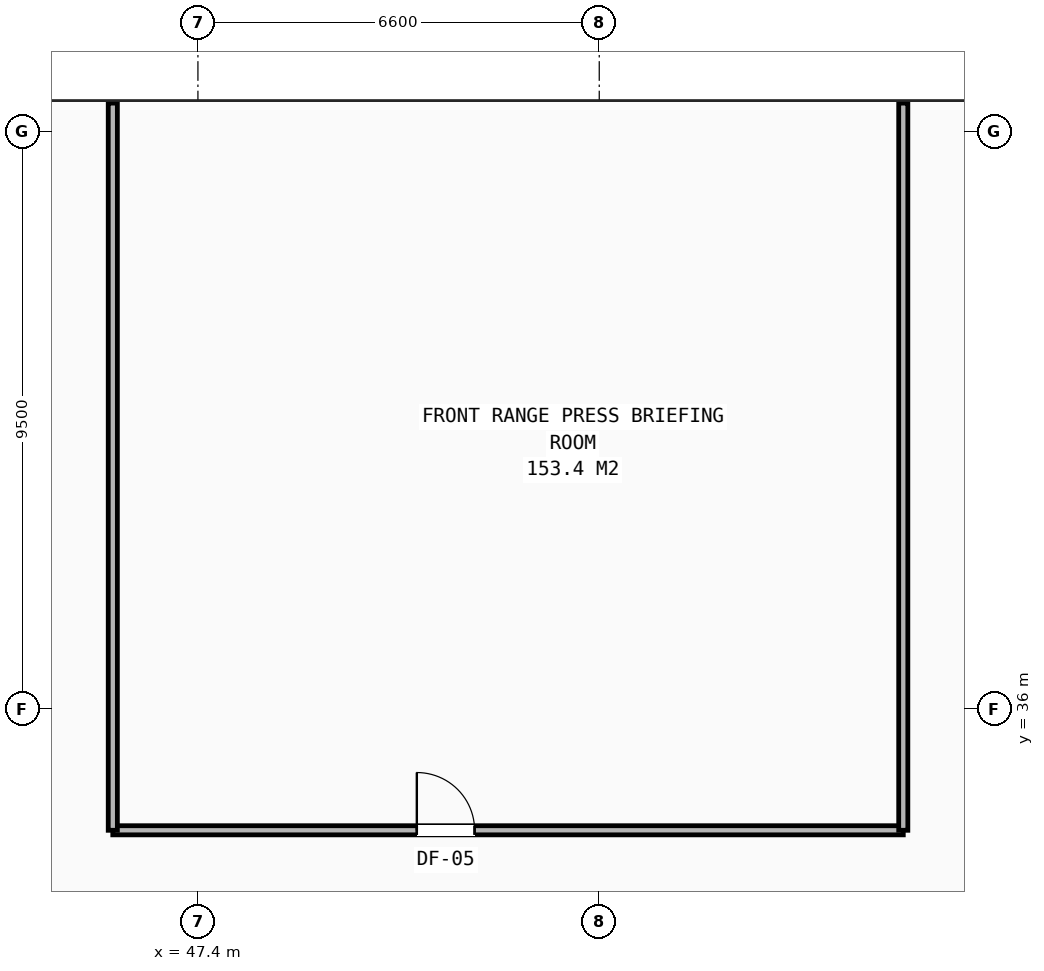
"""IFC4 building model, lengths in metres.
Left out: names, types, materials, properties, quantities, classifications, styles, units other than length and angle.
Written with IfcOpenShell. Run it as: python <this file> out.ifc"""

import sys

from ifc_helpers import new_model, si_unit, direction, frame, frame_2d, origin, place, context, subcontext, project, spatial, rectangle, extrude, element, fill, save


model = new_model("IFC4")
c1 = context("Model", 3, precision=1e-05, world=origin(), true_north=direction((0.0, 1.0)))
c2 = subcontext(c1, "Body", "Model", "MODEL_VIEW")
j1 = project(units=[si_unit("LENGTHUNIT", "METRE"), si_unit("PLANEANGLEUNIT", "RADIAN")], contexts=[c1])
p1 = place(None, origin())
s1 = spatial("IfcSite", under=j1, at=p1, CompositionType="ELEMENT")
p2 = place(p1, origin())
s2 = spatial("IfcBuilding", under=s1, at=p2, CompositionType="ELEMENT")
p3 = place(p2, frame((0.0, 0.0, 5.5)))
s3 = spatial("IfcBuildingStorey", under=s2, at=p3, CompositionType="ELEMENT", Elevation=5.5)
p4 = place(p3, frame((46.0, 34.0, 0.0), z_axis=(0.0, 0.0, 1.0), x_axis=(1.0, 0.0, 0.0)))
e1 = element("IfcWall", 1, at=p4, inside=s3, PredefinedType="PARTITIONING", context=c2, shape_type="SweptSolid", body=[
    extrude(rectangle(XDim=13.0, YDim=0.15, at=frame_2d((6.5, 0.0))), origin(), (0.0, 0.0, 1.0), 4.195),
])
p5 = place(p4, frame((5.0, 0.0, 0.0)))
e2 = element("IfcOpeningElement", 2, at=p5, cuts=e1, PredefinedType="OPENING", context=c2, shape_type="SweptSolid", body=[
    extrude(rectangle(XDim=0.95, YDim=2.1, at=frame_2d((0.475, 1.05))), frame((0.0, 0.085, 0.0), z_axis=(0.0, -1.0, 0.0), x_axis=(1.0, 0.0, 0.0)), (0.0, 0.0, 1.0), 0.17),
])
p6 = place(p3, frame((46.0, 34.0, 0.0), z_axis=(0.0, 0.0, 1.0), x_axis=(0.0, 1.0, 0.0)))
e3 = element("IfcWall", 3, at=p6, inside=s3, PredefinedType="PARTITIONING", context=c2, shape_type="SweptSolid", body=[
    extrude(rectangle(XDim=11.96, YDim=0.15, at=frame_2d((5.98, 0.0))), origin(), (0.0, 0.0, 1.0), 4.631),
])
p7 = place(p3, frame((59.0, 34.0, 0.0), z_axis=(0.0, 0.0, 1.0), x_axis=(0.0, 1.0, 0.0)))
e4 = element("IfcWall", 4, at=p7, inside=s3, PredefinedType="PARTITIONING", context=c2, shape_type="SweptSolid", body=[
    extrude(rectangle(XDim=11.96, YDim=0.15, at=frame_2d((5.98, 0.0))), origin(), (0.0, 0.0, 1.0), 4.195),
])
p8 = place(p5, origin())
e5 = element("IfcDoor", 5, at=p8, inside=s3, OperationType="SINGLE_SWING_LEFT", PredefinedType="DOOR", context=c2, shape_type="SweptSolid", body=[
    extrude(rectangle(XDim=0.95, YDim=2.1, at=frame_2d((0.475, 1.05))), frame((0.0, 0.025, 0.0), z_axis=(0.0, -1.0, 0.0), x_axis=(1.0, 0.0, 0.0)), (0.0, 0.0, 1.0), 0.05),
])
fill(e2, e5)
save(model, sys.argv[1])
